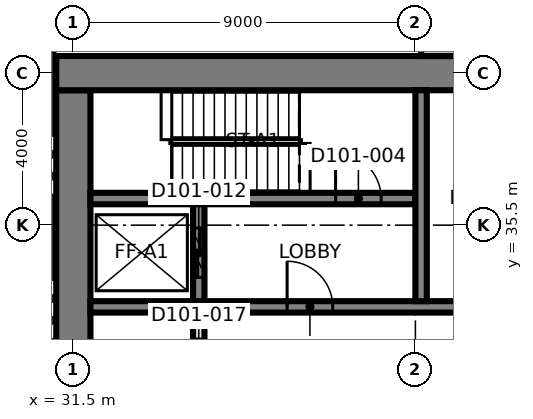
"""IFC4 building model, lengths in metres.
Left out: names, types, materials, properties, quantities, classifications, styles, units other than length and angle.
Written with IfcOpenShell. Run it as: python <this file> out.ifc"""

import sys

from ifc_helpers import new_model, si_unit, direction, frame, frame_2d, origin, place, context, subcontext, project, spatial, rectangle, extrude, element, fill, save


model = new_model("IFC4")
c1 = context("Model", 3, precision=1e-05, world=origin(), true_north=direction((0.0, 1.0)))
c2 = subcontext(c1, "Body", "Model", "MODEL_VIEW")
j1 = project(units=[si_unit("LENGTHUNIT", "METRE"), si_unit("PLANEANGLEUNIT", "RADIAN")], contexts=[c1])
p1 = place(None, origin())
s1 = spatial("IfcSite", under=j1, at=p1, CompositionType="ELEMENT")
p2 = place(p1, origin())
s2 = spatial("IfcBuilding", under=s1, at=p2, CompositionType="ELEMENT")
p3 = place(p2, frame((0.0, 0.0, -4.5)))
s3 = spatial("IfcBuildingStorey", under=s2, at=p3, CompositionType="ELEMENT", Elevation=-4.5)
p4 = place(p3, frame((31.5, 21.95, 0.0), z_axis=(0.0, 0.0, 1.0), x_axis=(0.0, 1.0, 0.0)))
e1 = element("IfcWall", 1, at=p4, inside=s3, PredefinedType="SHEAR", context=c2, shape_type="SweptSolid", body=[
    extrude(rectangle(XDim=17.1, YDim=0.9, at=frame_2d((8.55, 0.0))), origin(), (0.0, 0.0, 1.0), 4.5),
])
p5 = place(p3, frame((31.05, 39.5, 0.0), z_axis=(0.0, 0.0, 1.0), x_axis=(1.0, 0.0, 0.0)))
e2 = element("IfcWall", 2, at=p5, inside=s3, PredefinedType="SHEAR", context=c2, shape_type="SweptSolid", body=[
    extrude(rectangle(XDim=27.0, YDim=0.9, at=frame_2d((13.5, 0.0))), origin(), (0.0, 0.0, 1.0), 4.5),
])
p6 = place(p3, frame((31.95, 33.35, 0.0), z_axis=(0.0, 0.0, 1.0), x_axis=(1.0, 0.0, 0.0)))
e3 = element("IfcWall", 3, at=p6, inside=s3, PredefinedType="SHEAR", context=c2, shape_type="SweptSolid", body=[
    extrude(rectangle(XDim=26.1, YDim=0.3, at=frame_2d((13.05, 0.0))), origin(), (0.0, 0.0, 1.0), 4.5),
])
p7 = place(p6, frame((13.7, 0.0, 0.0)))
e4 = element("IfcOpeningElement", 4, at=p7, cuts=e3, PredefinedType="OPENING", context=c2, shape_type="SweptSolid", body=[
    extrude(rectangle(XDim=1.4, YDim=2.1, at=frame_2d((0.7, 1.05))), frame((0.0, 0.16, 0.0), z_axis=(0.0, -1.0, 0.0), x_axis=(1.0, 0.0, 0.0)), (0.0, 0.0, 1.0), 0.32),
])
p8 = place(p6, frame((5.175, 0.0, 0.0)))
e5 = element("IfcOpeningElement", 5, at=p8, cuts=e3, PredefinedType="OPENING", context=c2, shape_type="SweptSolid", body=[
    extrude(rectangle(XDim=1.2, YDim=2.1, at=frame_2d((0.6, 1.05))), frame((0.0, 0.16, 0.0), z_axis=(0.0, -1.0, 0.0), x_axis=(1.0, 0.0, 0.0)), (0.0, 0.0, 1.0), 0.32),
])
p9 = place(p6, frame((19.725, 0.0, 0.0)))
e6 = element("IfcOpeningElement", 6, at=p9, cuts=e3, PredefinedType="OPENING", context=c2, shape_type="SweptSolid", body=[
    extrude(rectangle(XDim=1.2, YDim=2.1, at=frame_2d((0.6, 1.05))), frame((0.0, 0.16, 0.0), z_axis=(0.0, -1.0, 0.0), x_axis=(1.0, 0.0, 0.0)), (0.0, 0.0, 1.0), 0.32),
])
p10 = place(p3, frame((31.95, 36.2, 0.0), z_axis=(0.0, 0.0, 1.0), x_axis=(1.0, 0.0, 0.0)))
e7 = element("IfcWall", 7, at=p10, inside=s3, PredefinedType="SHEAR", context=c2, shape_type="SweptSolid", body=[
    extrude(rectangle(XDim=8.55, YDim=0.3, at=frame_2d((4.275, 0.0))), origin(), (0.0, 0.0, 1.0), 4.5),
])
p11 = place(p10, frame((6.45, 0.0, 0.0)))
e8 = element("IfcOpeningElement", 8, at=p11, cuts=e7, PredefinedType="OPENING", context=c2, shape_type="SweptSolid", body=[
    extrude(rectangle(XDim=1.2, YDim=2.1, at=frame_2d((0.6, 1.05))), frame((0.0, 0.16, 0.0), z_axis=(0.0, -1.0, 0.0), x_axis=(1.0, 0.0, 0.0)), (0.0, 0.0, 1.0), 0.32),
])
p12 = place(p3, frame((40.65, 33.5, 0.0), z_axis=(0.0, 0.0, 1.0), x_axis=(0.0, 1.0, 0.0)))
e9 = element("IfcWall", 9, at=p12, inside=s3, PredefinedType="SHEAR", context=c2, shape_type="SweptSolid", body=[
    extrude(rectangle(XDim=5.55, YDim=0.3, at=frame_2d((2.775, 0.0))), origin(), (0.0, 0.0, 1.0), 4.5),
])
p13 = place(p3, frame((34.8, 33.5, 0.0), z_axis=(0.0, 0.0, 1.0), x_axis=(0.0, 1.0, 0.0)))
e10 = element("IfcWall", 10, at=p13, inside=s3, PredefinedType="SHEAR", context=c2, shape_type="SweptSolid", body=[
    extrude(rectangle(XDim=2.55, YDim=0.3, at=frame_2d((1.275, 0.0))), origin(), (0.0, 0.0, 1.0), 4.5),
])
p14 = place(p13, frame((0.625, 0.0, 0.0)))
e11 = element("IfcOpeningElement", 11, at=p14, cuts=e10, PredefinedType="OPENING", context=c2, shape_type="SweptSolid", body=[
    extrude(rectangle(XDim=1.3, YDim=2.4, at=frame_2d((0.65, 1.2))), frame((0.0, 0.16, 0.0), z_axis=(0.0, -1.0, 0.0), x_axis=(1.0, 0.0, 0.0)), (0.0, 0.0, 1.0), 0.32),
])
p15 = place(p3, frame((40.65, 40.1, 0.0), z_axis=(0.0, 0.0, 1.0), x_axis=(1.0, 0.0, 0.0)))
e12 = element("IfcWall", 12, at=p15, inside=s3, PredefinedType="PARTITIONING", context=c2, shape_type="SweptSolid", body=[
    extrude(rectangle(XDim=2.7, YDim=0.3, at=frame_2d((1.35, 0.0))), origin(), (0.0, 0.0, 1.0), 4.2),
])
p16 = place(p3, frame((34.8, 27.9, 0.0), z_axis=(0.0, 0.0, 1.0), x_axis=(0.0, 1.0, 0.0)))
e13 = element("IfcWall", 13, at=p16, inside=s3, PredefinedType="SOLIDWALL", context=c2, shape_type="SweptSolid", body=[
    extrude(rectangle(XDim=5.45, YDim=0.3, at=frame_2d((2.725, 0.0))), origin(), (0.0, 0.0, 1.0), 4.2),
])
p17 = place(p16, frame((3.6, 0.0, 0.0)))
e14 = element("IfcOpeningElement", 14, at=p17, cuts=e13, PredefinedType="OPENING", context=c2, shape_type="SweptSolid", body=[
    extrude(rectangle(XDim=1.0, YDim=2.1, at=frame_2d((0.5, 1.05))), frame((0.0, 0.16, 0.0), z_axis=(0.0, -1.0, 0.0), x_axis=(1.0, 0.0, 0.0)), (0.0, 0.0, 1.0), 0.32),
])
p18 = place(p8, origin())
e15 = element("IfcDoor", 15, at=p18, inside=s3, OperationType="SINGLE_SWING_LEFT", PredefinedType="DOOR", context=c2, shape_type="SweptSolid", body=[
    extrude(rectangle(XDim=1.2, YDim=2.1, at=frame_2d((0.6, 1.05))), frame((0.0, 0.025, 0.0), z_axis=(0.0, -1.0, 0.0), x_axis=(1.0, 0.0, 0.0)), (0.0, 0.0, 1.0), 0.05),
])
fill(e5, e15)
p19 = place(p11, origin())
e16 = element("IfcDoor", 16, at=p19, inside=s3, OperationType="SINGLE_SWING_RIGHT", PredefinedType="DOOR", context=c2, shape_type="SweptSolid", body=[
    extrude(rectangle(XDim=1.2, YDim=2.1, at=frame_2d((0.6, 1.05))), frame((0.0, 0.025, 0.0), z_axis=(0.0, -1.0, 0.0), x_axis=(1.0, 0.0, 0.0)), (0.0, 0.0, 1.0), 0.05),
])
fill(e8, e16)
p20 = place(p14, origin())
e17 = element("IfcDoor", 17, at=p20, inside=s3, OperationType="SLIDING_TO_LEFT", PredefinedType="DOOR", context=c2, shape_type="SweptSolid", body=[
    extrude(rectangle(XDim=1.3, YDim=2.4, at=frame_2d((0.65, 1.2))), frame((0.0, 0.025, 0.0), z_axis=(0.0, -1.0, 0.0), x_axis=(1.0, 0.0, 0.0)), (0.0, 0.0, 1.0), 0.05),
])
fill(e11, e17)
save(model, sys.argv[1])
